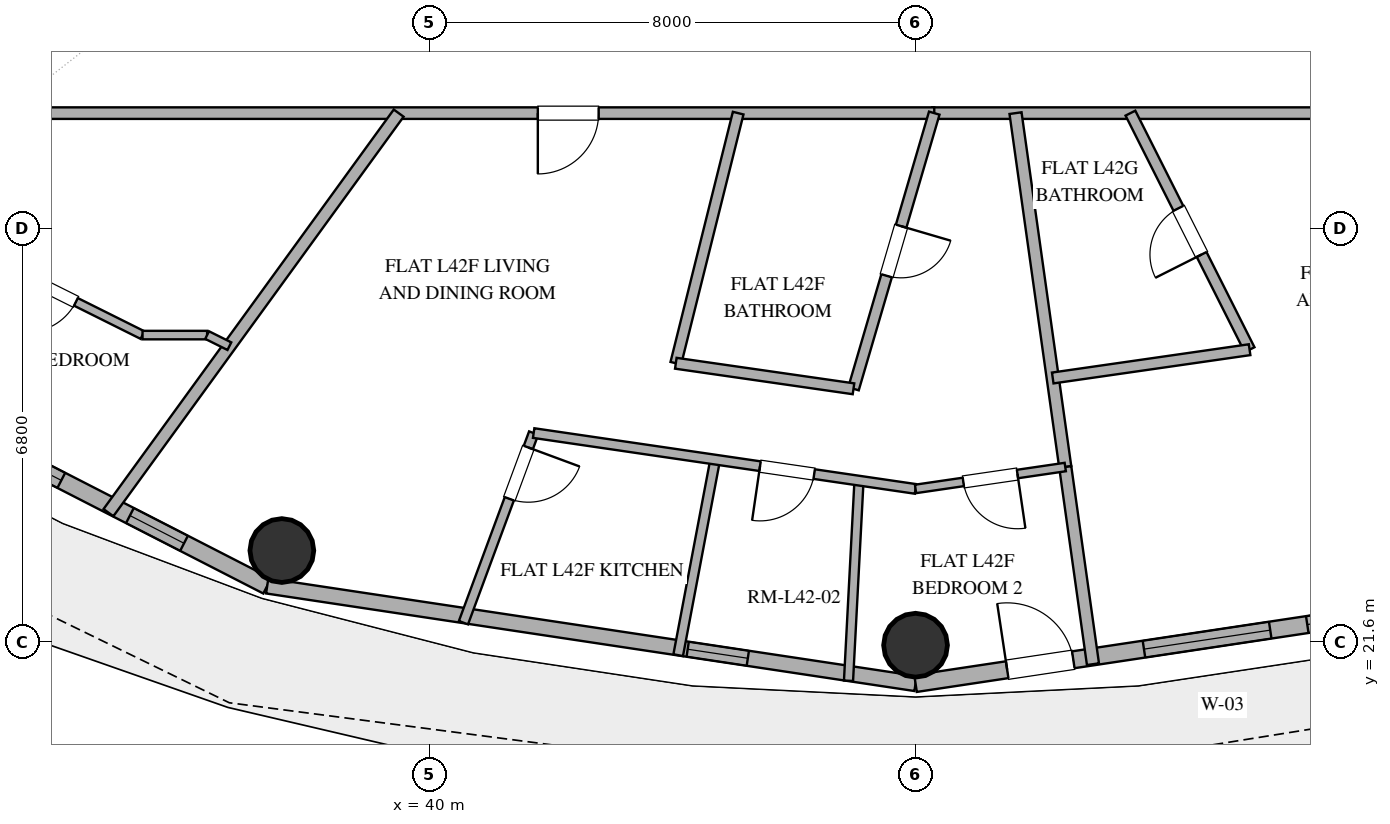
"""IFC4 building model, lengths in metres.
Left out: names, types, materials, properties, quantities, classifications, styles, units other than length and angle.
Written with IfcOpenShell. Run it as: python <this file> out.ifc"""

import sys

from ifc_helpers import new_model, si_unit, direction, frame, frame_2d, origin, origin_2d, place, context, subcontext, project, spatial, rectangle, hollow_circle, extrude, element, fill, save


model = new_model("IFC4")
c1 = context("Model", 3, precision=1e-05, world=origin(), true_north=direction((0.0, 1.0)))
c2 = subcontext(c1, "Body", "Model", "MODEL_VIEW")
j1 = project(units=[si_unit("LENGTHUNIT", "METRE"), si_unit("PLANEANGLEUNIT", "RADIAN")], contexts=[c1])
p1 = place(None, origin())
s1 = spatial("IfcSite", under=j1, at=p1, CompositionType="ELEMENT")
p2 = place(p1, origin())
s2 = spatial("IfcBuilding", under=s1, at=p2, CompositionType="ELEMENT")
p3 = place(p2, frame((0.0, 0.0, 168.6)))
s3 = spatial("IfcBuildingStorey", under=s2, at=p3, CompositionType="ELEMENT", Elevation=168.6)
for number, where, z_axis, x_axis in (
    (1, (37.578, 23.107, 0.0), (0.0, 0.0, 1.0), (1.0, 0.0, 0.0)),
    (2, (48.0, 21.55, 0.0), (0.0, 0.0, 1.0), (1.0, 0.0, 0.0)),
):
    element("IfcColumn", number, at=place(p3, frame(where, z_axis=z_axis, x_axis=x_axis)), inside=s3, PredefinedType="COLUMN", context=c2, shape_type="SweptSolid", body=[
        extrude(hollow_circle(Radius=0.525, WallThickness=0.028, at=origin_2d()), origin(), (0.0, 0.0, 1.0), 3.38),
    ])
p4 = place(p3, frame((28.424, 27.094, 0.0), z_axis=(0.0, 0.0, 1.0), x_axis=(0.889872523182, -0.456209263919, 0.0)))
e3 = element("IfcWall", 3, at=p4, inside=s3, PredefinedType="SOLIDWALL", context=c2, shape_type="SweptSolid", body=[
    extrude(rectangle(XDim=10.016, YDim=0.28, at=frame_2d((5.008, 0.0))), origin(), (0.0, 0.0, 1.0), 3.38),
])
p5 = place(p4, frame((2.829, 0.0, 0.85)))
e4 = element("IfcOpeningElement", 4, at=p5, cuts=e3, PredefinedType="OPENING", context=c2, shape_type="SweptSolid", body=[
    extrude(rectangle(XDim=1.35, YDim=1.8, at=frame_2d((0.675, 0.9))), frame((0.0, 0.15, 0.0), z_axis=(0.0, -1.0, 0.0), x_axis=(1.0, 0.0, 0.0)), (0.0, 0.0, 1.0), 0.3),
])
p6 = place(p4, frame((4.861, 0.0, 0.85)))
e5 = element("IfcOpeningElement", 5, at=p6, cuts=e3, PredefinedType="OPENING", context=c2, shape_type="SweptSolid", body=[
    extrude(rectangle(XDim=1.35, YDim=1.8, at=frame_2d((0.675, 0.9))), frame((0.0, 0.15, 0.0), z_axis=(0.0, -1.0, 0.0), x_axis=(1.0, 0.0, 0.0)), (0.0, 0.0, 1.0), 0.3),
])
p7 = place(p4, frame((7.479, 0.0, 0.85)))
e6 = element("IfcOpeningElement", 6, at=p7, cuts=e3, PredefinedType="OPENING", context=c2, shape_type="SweptSolid", body=[
    extrude(rectangle(XDim=1.0, YDim=1.8, at=frame_2d((0.5, 0.9))), frame((0.0, 0.15, 0.0), z_axis=(0.0, -1.0, 0.0), x_axis=(1.0, 0.0, 0.0)), (0.0, 0.0, 1.0), 0.3),
])
p8 = place(p3, frame((37.337, 22.525, 0.0), z_axis=(0.0, 0.0, 1.0), x_axis=(0.988863993413, -0.148822049884, 0.0)))
e7 = element("IfcWall", 7, at=p8, inside=s3, PredefinedType="SOLIDWALL", context=c2, shape_type="SweptSolid", body=[
    extrude(rectangle(XDim=10.783, YDim=0.25, at=frame_2d((5.392, 0.0))), origin(), (0.0, 0.0, 1.0), 3.38),
])
p9 = place(p8, frame((6.993, 0.0, 0.35)))
e8 = element("IfcOpeningElement", 8, at=p9, cuts=e7, PredefinedType="OPENING", context=c2, shape_type="SweptSolid", body=[
    extrude(rectangle(XDim=1.0, YDim=1.05, at=frame_2d((0.5, 0.525))), frame((0.0, 0.135, 0.0), z_axis=(0.0, -1.0, 0.0), x_axis=(1.0, 0.0, 0.0)), (0.0, 0.0, 1.0), 0.27),
])
p10 = place(p3, frame((48.0, 20.92, 0.0), z_axis=(0.0, 0.0, 1.0), x_axis=(0.988863993413, 0.148822049884, 0.0)))
e9 = element("IfcWall", 9, at=p10, inside=s3, PredefinedType="SOLIDWALL", context=c2, shape_type="SweptSolid", body=[
    extrude(rectangle(XDim=10.783, YDim=0.28, at=frame_2d((5.392, 0.0))), origin(), (0.0, 0.0, 1.0), 3.38),
])
p11 = place(p10, frame((1.524, 0.0, 0.0)))
e10 = element("IfcOpeningElement", 10, at=p11, cuts=e9, PredefinedType="OPENING", context=c2, shape_type="SweptSolid", body=[
    extrude(rectangle(XDim=1.1, YDim=2.25, at=frame_2d((0.55, 1.125))), frame((0.0, 0.15, 0.0), z_axis=(0.0, -1.0, 0.0), x_axis=(1.0, 0.0, 0.0)), (0.0, 0.0, 1.0), 0.3),
])
p12 = place(p10, frame((3.799, 0.0, 0.85)))
e11 = element("IfcOpeningElement", 11, at=p12, cuts=e9, PredefinedType="OPENING", context=c2, shape_type="SweptSolid", body=[
    extrude(rectangle(XDim=2.1, YDim=2.2, at=frame_2d((1.05, 1.1))), frame((0.0, 0.15, 0.0), z_axis=(0.0, -1.0, 0.0), x_axis=(1.0, 0.0, 0.0)), (0.0, 0.0, 1.0), 0.3),
])
p13 = place(p10, frame((6.515, 0.0, 0.85)))
e12 = element("IfcOpeningElement", 12, at=p13, cuts=e9, PredefinedType="OPENING", context=c2, shape_type="SweptSolid", body=[
    extrude(rectangle(XDim=2.1, YDim=2.2, at=frame_2d((1.05, 1.1))), frame((0.0, 0.15, 0.0), z_axis=(0.0, -1.0, 0.0), x_axis=(1.0, 0.0, 0.0)), (0.0, 0.0, 1.0), 0.3),
])
p14 = place(p3, frame((63.9, 30.3, 0.0), z_axis=(0.0, 0.0, 1.0), x_axis=(-1.0, 0.0, 0.0)))
e13 = element("IfcWall", 13, at=p14, inside=s3, PredefinedType="PARTITIONING", context=c2, shape_type="SweptSolid", body=[
    extrude(rectangle(XDim=15.625, YDim=0.19, at=frame_2d((7.813, 0.0))), origin(), (0.0, 0.0, 1.0), 2.74),
])
p15 = place(p14, frame((6.137, 0.0, 0.0)))
e14 = element("IfcOpeningElement", 14, at=p15, cuts=e13, PredefinedType="OPENING", context=c2, shape_type="SweptSolid", body=[
    extrude(rectangle(XDim=1.0, YDim=2.2, at=frame_2d((0.5, 1.1))), frame((0.0, 0.105, 0.0), z_axis=(0.0, -1.0, 0.0), x_axis=(1.0, 0.0, 0.0)), (0.0, 0.0, 1.0), 0.21),
])
p16 = place(p3, frame((48.308, 30.3, 0.0), z_axis=(0.0, 0.0, 1.0), x_axis=(-1.0, 0.0, 0.0)))
e15 = element("IfcWall", 15, at=p16, inside=s3, PredefinedType="PARTITIONING", context=c2, shape_type="SweptSolid", body=[
    extrude(rectangle(XDim=16.208, YDim=0.19, at=frame_2d((8.104, 0.0))), origin(), (0.0, 0.0, 1.0), 2.74),
])
p17 = place(p16, frame((5.52, 0.0, 0.0)))
e16 = element("IfcOpeningElement", 16, at=p17, cuts=e15, PredefinedType="OPENING", context=c2, shape_type="SweptSolid", body=[
    extrude(rectangle(XDim=1.0, YDim=2.2, at=frame_2d((0.5, 1.1))), frame((0.0, 0.105, 0.0), z_axis=(0.0, -1.0, 0.0), x_axis=(1.0, 0.0, 0.0)), (0.0, 0.0, 1.0), 0.21),
])
p18 = place(p3, frame((34.726, 23.73, 0.0), z_axis=(0.0, 0.0, 1.0), x_axis=(0.587785528328, 0.809016793823, 0.0)))
e17 = element("IfcWall", 17, at=p18, inside=s3, PredefinedType="PARTITIONING", context=c2, shape_type="SweptSolid", body=[
    extrude(rectangle(XDim=8.121, YDim=0.2, at=frame_2d((4.061, 0.0))), origin(), (0.0, 0.0, 1.0), 2.74),
])
p19 = place(p3, frame((48.308, 30.3, 0.0), z_axis=(0.0, 0.0, 1.0), x_axis=(-0.281192482413, -0.9596513887, 0.0)))
e18 = element("IfcWall", 18, at=p19, inside=s3, PredefinedType="PLUMBINGWALL", context=c2, shape_type="SweptSolid", body=[
    extrude(rectangle(XDim=4.724, YDim=0.18, at=frame_2d((2.362, 0.0))), origin(), (0.0, 0.0, 1.0), 2.74),
])
p20 = place(p19, frame((1.937, 0.0, 0.0)))
e19 = element("IfcOpeningElement", 19, at=p20, cuts=e18, PredefinedType="OPENING", context=c2, shape_type="SweptSolid", body=[
    extrude(rectangle(XDim=0.85, YDim=2.1, at=frame_2d((0.425, 1.05))), frame((0.0, 0.1, 0.0), z_axis=(0.0, -1.0, 0.0), x_axis=(1.0, 0.0, 0.0)), (0.0, 0.0, 1.0), 0.2),
])
p21 = place(p3, frame((49.644, 30.3, 0.0), z_axis=(0.0, 0.0, 1.0), x_axis=(0.139158723068, -0.990270089316, 0.0)))
e20 = element("IfcWall", 20, at=p21, inside=s3, PredefinedType="PARTITIONING", context=c2, shape_type="SweptSolid", body=[
    extrude(rectangle(XDim=5.877, YDim=0.2, at=frame_2d((2.938, 0.0))), origin(), (0.0, 0.0, 1.0), 2.74),
])
p22 = place(p3, frame((53.494, 26.41, 0.0), z_axis=(0.0, 0.0, 1.0), x_axis=(-0.449879384809, 0.89308932315, 0.0)))
e21 = element("IfcWall", 21, at=p22, inside=s3, PredefinedType="PLUMBINGWALL", context=c2, shape_type="SweptSolid", body=[
    extrude(rectangle(XDim=4.356, YDim=0.18, at=frame_2d((2.178, 0.0))), origin(), (0.0, 0.0, 1.0), 2.74),
])
p23 = place(p22, frame((1.753, 0.0, 0.0)))
e22 = element("IfcOpeningElement", 22, at=p23, cuts=e21, PredefinedType="OPENING", context=c2, shape_type="SweptSolid", body=[
    extrude(rectangle(XDim=0.85, YDim=2.1, at=frame_2d((0.425, 1.05))), frame((0.0, 0.1, 0.0), z_axis=(0.0, -1.0, 0.0), x_axis=(1.0, 0.0, 0.0)), (0.0, 0.0, 1.0), 0.2),
])
p24 = place(p3, frame((44.057, 26.187, 0.0), z_axis=(0.0, 0.0, 1.0), x_axis=(0.241939344098, 0.97029137571, 0.0)))
e23 = element("IfcWall", 23, at=p24, inside=s3, PredefinedType="PLUMBINGWALL", context=c2, shape_type="SweptSolid", body=[
    extrude(rectangle(XDim=4.239, YDim=0.18, at=frame_2d((2.12, 0.0))), origin(), (0.0, 0.0, 1.0), 2.74),
])
p25 = place(p3, frame((35.287, 26.65, 0.0), z_axis=(0.0, 0.0, 1.0), x_axis=(-0.894937323042, 0.44619187333, 0.0)))
e24 = element("IfcWall", 24, at=p25, inside=s3, PredefinedType="PARTITIONING", context=c2, shape_type="SweptSolid", body=[
    extrude(rectangle(XDim=5.354, YDim=0.14, at=frame_2d((2.677, 0.0))), origin(), (0.0, 0.0, 1.0), 2.74),
])
p26 = place(p25, frame((1.224, 0.0, 0.0)))
e25 = element("IfcOpeningElement", 25, at=p26, cuts=e24, PredefinedType="OPENING", context=c2, shape_type="SweptSolid", body=[
    extrude(rectangle(XDim=0.9, YDim=2.1, at=frame_2d((0.45, 1.05))), frame((0.0, 0.08, 0.0), z_axis=(0.0, -1.0, 0.0), x_axis=(1.0, 0.0, 0.0)), (0.0, 0.0, 1.0), 0.16),
])
p27 = place(p25, frame((3.884, 0.0, 0.0)))
e26 = element("IfcOpeningElement", 26, at=p27, cuts=e24, PredefinedType="OPENING", context=c2, shape_type="SweptSolid", body=[
    extrude(rectangle(XDim=0.9, YDim=2.1, at=frame_2d((0.45, 1.05))), frame((0.0, 0.08, 0.0), z_axis=(0.0, -1.0, 0.0), x_axis=(1.0, 0.0, 0.0)), (0.0, 0.0, 1.0), 0.16),
])
p28 = place(p3, frame((41.719, 25.039, 0.0), z_axis=(0.0, 0.0, 1.0), x_axis=(-0.347266531909, -0.937766471898, 0.0)))
e27 = element("IfcWall", 27, at=p28, inside=s3, PredefinedType="PLUMBINGWALL", context=c2, shape_type="SweptSolid", body=[
    extrude(rectangle(XDim=3.325, YDim=0.16, at=frame_2d((1.663, 0.0))), origin(), (0.0, 0.0, 1.0), 2.74),
])
p29 = place(p28, frame((0.253, 0.0, 0.0)))
e28 = element("IfcOpeningElement", 28, at=p29, cuts=e27, PredefinedType="OPENING", context=c2, shape_type="SweptSolid", body=[
    extrude(rectangle(XDim=0.9, YDim=2.1, at=frame_2d((0.45, 1.05))), frame((0.0, 0.09, 0.0), z_axis=(0.0, -1.0, 0.0), x_axis=(1.0, 0.0, 0.0)), (0.0, 0.0, 1.0), 0.18),
])
p30 = place(p3, frame((46.898, 20.965, 0.0), z_axis=(0.0, 0.0, 1.0), x_axis=(0.052302203263, 0.998631303101, 0.0)))
e29 = element("IfcWall", 29, at=p30, inside=s3, PredefinedType="PARTITIONING", context=c2, shape_type="SweptSolid", body=[
    extrude(rectangle(XDim=3.295, YDim=0.15, at=frame_2d((1.648, 0.0))), origin(), (0.0, 0.0, 1.0), 2.74),
])
p31 = place(p3, frame((50.462, 24.48, 0.0), z_axis=(0.0, 0.0, 1.0), x_axis=(0.139145146576, -0.990271997072, 0.0)))
e30 = element("IfcWall", 30, at=p31, inside=s3, PredefinedType="PARTITIONING", context=c2, shape_type="SweptSolid", body=[
    extrude(rectangle(XDim=3.274, YDim=0.2, at=frame_2d((1.637, 0.0))), origin(), (0.0, 0.0, 1.0), 2.74),
])
p32 = place(p3, frame((44.096, 21.386, 0.0), z_axis=(0.0, 0.0, 1.0), x_axis=(0.186049333211, 0.982540404061, 0.0)))
e31 = element("IfcWall", 31, at=p32, inside=s3, PredefinedType="PLUMBINGWALL", context=c2, shape_type="SweptSolid", body=[
    extrude(rectangle(XDim=3.273, YDim=0.16, at=frame_2d((1.636, 0.0))), origin(), (0.0, 0.0, 1.0), 2.74),
])
p33 = place(p3, frame((50.257, 25.944, 0.0), z_axis=(0.0, 0.0, 1.0), x_axis=(0.989826700743, 0.142278257286, 0.0)))
e32 = element("IfcWall", 32, at=p33, inside=s3, PredefinedType="PLUMBINGWALL", context=c2, shape_type="SweptSolid", body=[
    extrude(rectangle(XDim=3.271, YDim=0.18, at=frame_2d((1.635, 0.0))), origin(), (0.0, 0.0, 1.0), 2.74),
])
p34 = place(p3, frame((48.0, 24.12, 0.0), z_axis=(0.0, 0.0, 1.0), x_axis=(-0.989475575411, 0.144699985022, 0.0)))
e33 = element("IfcWall", 33, at=p34, inside=s3, PredefinedType="PLUMBINGWALL", context=c2, shape_type="SweptSolid", body=[
    extrude(rectangle(XDim=6.347, YDim=0.16, at=frame_2d((3.174, 0.0))), origin(), (0.0, 0.0, 1.0), 2.74),
])
p35 = place(p34, frame((1.685, 0.0, 0.0)))
e34 = element("IfcOpeningElement", 34, at=p35, cuts=e33, PredefinedType="OPENING", context=c2, shape_type="SweptSolid", body=[
    extrude(rectangle(XDim=0.9, YDim=2.1, at=frame_2d((0.45, 1.05))), frame((0.0, 0.09, 0.0), z_axis=(0.0, -1.0, 0.0), x_axis=(1.0, 0.0, 0.0)), (0.0, 0.0, 1.0), 0.18),
])
p36 = place(p3, frame((46.979, 25.767, 0.0), z_axis=(0.0, 0.0, 1.0), x_axis=(-0.989820071869, 0.142324366588, 0.0)))
e35 = element("IfcWall", 35, at=p36, inside=s3, PredefinedType="PLUMBINGWALL", context=c2, shape_type="SweptSolid", body=[
    extrude(rectangle(XDim=2.952, YDim=0.18, at=frame_2d((1.476, 0.0))), origin(), (0.0, 0.0, 1.0), 2.74),
])
p37 = place(p3, frame((50.462, 24.48, 0.0), z_axis=(0.0, 0.0, 1.0), x_axis=(-0.989489157172, -0.144607080872, 0.0)))
e36 = element("IfcWall", 36, at=p37, inside=s3, PredefinedType="PARTITIONING", context=c2, shape_type="SweptSolid", body=[
    extrude(rectangle(XDim=2.489, YDim=0.14, at=frame_2d((1.244, 0.0))), origin(), (0.0, 0.0, 1.0), 2.74),
])
p38 = place(p37, frame((0.794, 0.0, 0.0)))
e37 = element("IfcOpeningElement", 37, at=p38, cuts=e36, PredefinedType="OPENING", context=c2, shape_type="SweptSolid", body=[
    extrude(rectangle(XDim=0.9, YDim=2.1, at=frame_2d((0.45, 1.05))), frame((0.0, 0.08, 0.0), z_axis=(0.0, -1.0, 0.0), x_axis=(1.0, 0.0, 0.0)), (0.0, 0.0, 1.0), 0.16),
])
p39 = place(p3, frame((36.349, 26.65, 0.0), z_axis=(0.0, 0.0, 1.0), x_axis=(-1.0, 0.0, 0.0)))
e38 = element("IfcWall", 38, at=p39, inside=s3, PredefinedType="PARTITIONING", context=c2, shape_type="SweptSolid", body=[
    extrude(rectangle(XDim=1.062, YDim=0.14, at=frame_2d((0.531, 0.0))), origin(), (0.0, 0.0, 1.0), 2.74),
])
p40 = place(p3, frame((36.715, 26.468, 0.0), z_axis=(0.0, 0.0, 1.0), x_axis=(-0.895142158028, 0.445780794698, 0.0)))
e39 = element("IfcWall", 39, at=p40, inside=s3, PredefinedType="PARTITIONING", context=c2, shape_type="SweptSolid", body=[
    extrude(rectangle(XDim=0.409, YDim=0.14, at=frame_2d((0.205, 0.0))), origin(), (0.0, 0.0, 1.0), 2.74),
])
p41 = place(p6, origin())
e40 = element("IfcWindow", 40, at=p41, inside=s3, PartitioningType="SINGLE_PANEL", PredefinedType="WINDOW", context=c2, shape_type="SweptSolid", body=[
    extrude(rectangle(XDim=1.35, YDim=1.8, at=frame_2d((0.675, 0.9))), frame((0.0, 0.03, 0.0), z_axis=(0.0, -1.0, 0.0), x_axis=(1.0, 0.0, 0.0)), (0.0, 0.0, 1.0), 0.06),
])
fill(e5, e40)
p42 = place(p7, origin())
e41 = element("IfcWindow", 41, at=p42, inside=s3, PartitioningType="SINGLE_PANEL", PredefinedType="WINDOW", context=c2, shape_type="SweptSolid", body=[
    extrude(rectangle(XDim=1.0, YDim=1.8, at=frame_2d((0.5, 0.9))), frame((0.0, 0.03, 0.0), z_axis=(0.0, -1.0, 0.0), x_axis=(1.0, 0.0, 0.0)), (0.0, 0.0, 1.0), 0.06),
])
fill(e6, e41)
p43 = place(p11, origin())
e42 = element("IfcDoor", 42, at=p43, inside=s3, OperationType="SINGLE_SWING_LEFT", PredefinedType="DOOR", context=c2, shape_type="SweptSolid", body=[
    extrude(rectangle(XDim=1.1, YDim=2.25, at=frame_2d((0.55, 1.125))), frame((0.0, 0.025, 0.0), z_axis=(0.0, -1.0, 0.0), x_axis=(1.0, 0.0, 0.0)), (0.0, 0.0, 1.0), 0.05),
])
fill(e10, e42)
p44 = place(p12, origin())
e43 = element("IfcWindow", 43, at=p44, inside=s3, PartitioningType="SINGLE_PANEL", PredefinedType="WINDOW", context=c2, shape_type="SweptSolid", body=[
    extrude(rectangle(XDim=2.1, YDim=2.2, at=frame_2d((1.05, 1.1))), frame((0.0, 0.03, 0.0), z_axis=(0.0, -1.0, 0.0), x_axis=(1.0, 0.0, 0.0)), (0.0, 0.0, 1.0), 0.06),
])
fill(e11, e43)
p45 = place(p13, origin())
e44 = element("IfcWindow", 44, at=p45, inside=s3, PartitioningType="SINGLE_PANEL", PredefinedType="WINDOW", context=c2, shape_type="SweptSolid", body=[
    extrude(rectangle(XDim=2.1, YDim=2.2, at=frame_2d((1.05, 1.1))), frame((0.0, 0.03, 0.0), z_axis=(0.0, -1.0, 0.0), x_axis=(1.0, 0.0, 0.0)), (0.0, 0.0, 1.0), 0.06),
])
fill(e12, e44)
p46 = place(p9, origin())
e45 = element("IfcWindow", 45, at=p46, inside=s3, PartitioningType="SINGLE_PANEL", PredefinedType="WINDOW", context=c2, shape_type="SweptSolid", body=[
    extrude(rectangle(XDim=1.0, YDim=1.05, at=frame_2d((0.5, 0.525))), frame((0.0, 0.03, 0.0), z_axis=(0.0, -1.0, 0.0), x_axis=(1.0, 0.0, 0.0)), (0.0, 0.0, 1.0), 0.06),
])
fill(e8, e45)
p47 = place(p17, origin())
e46 = element("IfcDoor", 46, at=p47, inside=s3, OperationType="SINGLE_SWING_RIGHT", PredefinedType="DOOR", context=c2, shape_type="SweptSolid", body=[
    extrude(rectangle(XDim=1.0, YDim=2.2, at=frame_2d((0.5, 1.1))), frame((0.0, 0.025, 0.0), z_axis=(0.0, -1.0, 0.0), x_axis=(1.0, 0.0, 0.0)), (0.0, 0.0, 1.0), 0.05),
])
fill(e16, e46)
p48 = place(p20, origin())
e47 = element("IfcDoor", 47, at=p48, inside=s3, OperationType="SINGLE_SWING_LEFT", PredefinedType="DOOR", context=c2, shape_type="SweptSolid", body=[
    extrude(rectangle(XDim=0.85, YDim=2.1, at=frame_2d((0.425, 1.05))), frame((0.0, 0.025, 0.0), z_axis=(0.0, -1.0, 0.0), x_axis=(1.0, 0.0, 0.0)), (0.0, 0.0, 1.0), 0.05),
])
fill(e19, e47)
p49 = place(p23, origin())
e48 = element("IfcDoor", 48, at=p49, inside=s3, OperationType="SINGLE_SWING_LEFT", PredefinedType="DOOR", context=c2, shape_type="SweptSolid", body=[
    extrude(rectangle(XDim=0.85, YDim=2.1, at=frame_2d((0.425, 1.05))), frame((0.0, 0.025, 0.0), z_axis=(0.0, -1.0, 0.0), x_axis=(1.0, 0.0, 0.0)), (0.0, 0.0, 1.0), 0.05),
])
fill(e22, e48)
p50 = place(p26, origin())
e49 = element("IfcDoor", 49, at=p50, inside=s3, OperationType="SINGLE_SWING_RIGHT", PredefinedType="DOOR", context=c2, shape_type="SweptSolid", body=[
    extrude(rectangle(XDim=0.9, YDim=2.1, at=frame_2d((0.45, 1.05))), frame((0.0, 0.025, 0.0), z_axis=(0.0, -1.0, 0.0), x_axis=(1.0, 0.0, 0.0)), (0.0, 0.0, 1.0), 0.05),
])
fill(e25, e49)
p51 = place(p29, origin())
e50 = element("IfcDoor", 50, at=p51, inside=s3, OperationType="SINGLE_SWING_LEFT", PredefinedType="DOOR", context=c2, shape_type="SweptSolid", body=[
    extrude(rectangle(XDim=0.9, YDim=2.1, at=frame_2d((0.45, 1.05))), frame((0.0, 0.025, 0.0), z_axis=(0.0, -1.0, 0.0), x_axis=(1.0, 0.0, 0.0)), (0.0, 0.0, 1.0), 0.05),
])
fill(e28, e50)
p52 = place(p35, origin())
e51 = element("IfcDoor", 51, at=p52, inside=s3, OperationType="SINGLE_SWING_RIGHT", PredefinedType="DOOR", context=c2, shape_type="SweptSolid", body=[
    extrude(rectangle(XDim=0.9, YDim=2.1, at=frame_2d((0.45, 1.05))), frame((0.0, 0.025, 0.0), z_axis=(0.0, -1.0, 0.0), x_axis=(1.0, 0.0, 0.0)), (0.0, 0.0, 1.0), 0.05),
])
fill(e34, e51)
p53 = place(p38, origin())
e52 = element("IfcDoor", 52, at=p53, inside=s3, OperationType="SINGLE_SWING_LEFT", PredefinedType="DOOR", context=c2, shape_type="SweptSolid", body=[
    extrude(rectangle(XDim=0.9, YDim=2.1, at=frame_2d((0.45, 1.05))), frame((0.0, 0.025, 0.0), z_axis=(0.0, -1.0, 0.0), x_axis=(1.0, 0.0, 0.0)), (0.0, 0.0, 1.0), 0.05),
])
fill(e37, e52)
save(model, sys.argv[1])
